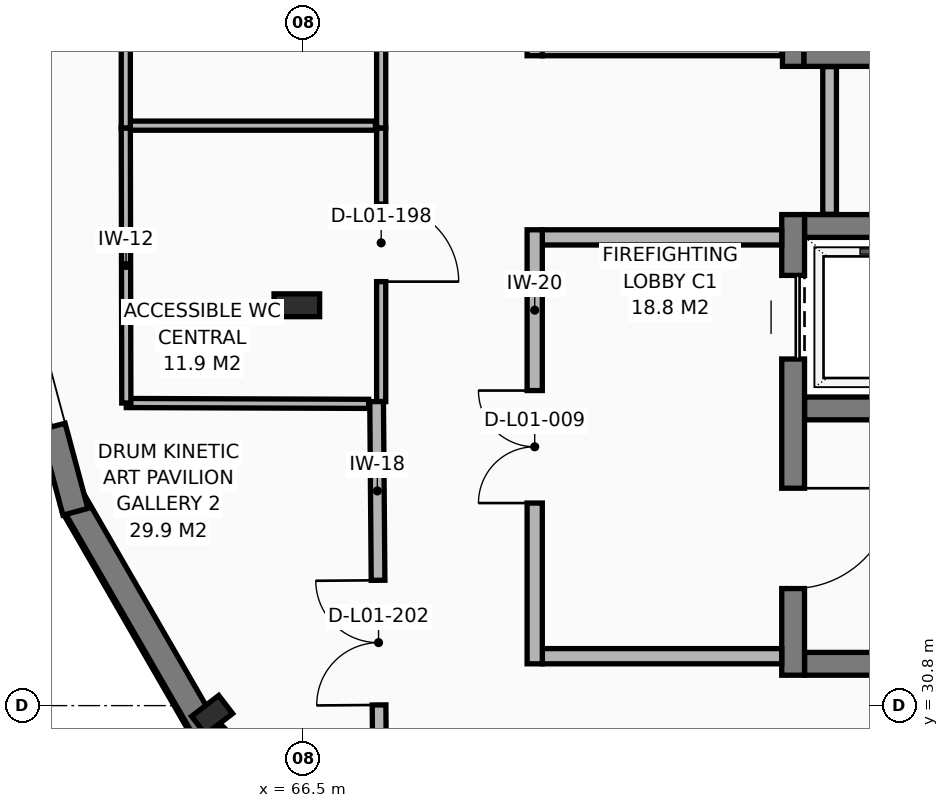
"""IFC4 building model, lengths in metres.
Left out: names, types, materials, properties, quantities, classifications, styles, units other than length and angle.
Written with IfcOpenShell. Run it as: python <this file> out.ifc"""

import sys

from ifc_helpers import new_model, si_unit, direction, frame, frame_2d, origin, origin_2d, place, context, subcontext, project, spatial, rectangle, i_section, extrude, element, fill, save


model = new_model("IFC4")
c1 = context("Model", 3, precision=1e-05, world=origin(), true_north=direction((0.0, 1.0)))
c2 = subcontext(c1, "Body", "Model", "MODEL_VIEW")
j1 = project(units=[si_unit("LENGTHUNIT", "METRE"), si_unit("PLANEANGLEUNIT", "RADIAN")], contexts=[c1])
p1 = place(None, origin())
s1 = spatial("IfcSite", under=j1, at=p1, CompositionType="ELEMENT")
p2 = place(p1, origin())
s2 = spatial("IfcBuilding", under=s1, at=p2, CompositionType="ELEMENT")
p3 = place(p2, frame((0.0, 0.0, 5.1)))
s3 = spatial("IfcBuildingStorey", under=s2, at=p3, CompositionType="ELEMENT", Elevation=5.1)
p4 = place(p3, frame((65.305, 30.677, 0.0), z_axis=(0.0, 0.0, 1.0), x_axis=(-0.793353340291, -0.608761429009, 0.0)))
e1 = element("IfcColumn", 1, at=p4, inside=s3, PredefinedType="COLUMN", context=c2, shape_type="SweptSolid", body=[
    extrude(i_section(OverallWidth=0.3, OverallDepth=0.45, WebThickness=0.014, FlangeThickness=0.026, FilletRadius=0.027, at=origin_2d()), origin(), (0.0, 0.0, 1.0), 4.42),
])
p5 = place(p3, frame((66.42, 36.067, 0.0), z_axis=(0.0, 0.0, 1.0), x_axis=(1.0, 0.0, 0.0)))
e2 = element("IfcColumn", 2, at=p5, inside=s3, PredefinedType="COLUMN", context=c2, shape_type="SweptSolid", body=[
    extrude(i_section(OverallWidth=0.3, OverallDepth=0.6, WebThickness=0.015, FlangeThickness=0.03, FilletRadius=0.027, at=origin_2d()), origin(), (0.0, 0.0, 1.0), 4.42),
])
p6 = place(p3, frame((67.689, 28.043, 0.0), z_axis=(0.0, 0.0, 1.0), x_axis=(-0.707106781187, 0.707106781187, 0.0)))
e3 = element("IfcWall", 3, at=p6, inside=s3, PredefinedType="SOLIDWALL", context=c2, shape_type="SweptSolid", body=[
    extrude(rectangle(XDim=3.571, YDim=0.34, at=frame_2d((1.786, 0.0))), origin(), (0.0, 0.0, 1.0), 4.2),
])
p7 = place(p6, frame((1.161, 0.0, 0.85)))
e4 = element("IfcOpeningElement", 4, at=p7, cuts=e3, PredefinedType="OPENING", context=c2, shape_type="SweptSolid", body=[
    extrude(rectangle(XDim=1.25, YDim=1.7, at=frame_2d((0.625, 0.85))), frame((0.0, 0.18, 0.0), z_axis=(0.0, -1.0, 0.0), x_axis=(1.0, 0.0, 0.0)), (0.0, 0.0, 1.0), 0.36),
])
p8 = place(p3, frame((65.249, 30.421, 0.0), z_axis=(0.0, 0.0, 1.0), x_axis=(-0.500006500783, 0.866021650523, 0.0)))
e5 = element("IfcWall", 5, at=p8, inside=s3, PredefinedType="SOLIDWALL", context=c2, shape_type="SweptSolid", body=[
    extrude(rectangle(XDim=3.571, YDim=0.34, at=frame_2d((1.786, 0.0))), origin(), (0.0, 0.0, 1.0), 4.2),
])
p9 = place(p3, frame((63.507, 33.35, 0.0), z_axis=(0.0, 0.0, 1.0), x_axis=(-0.258764562387, 0.965940423242, 0.0)))
e6 = element("IfcWall", 6, at=p9, inside=s3, PredefinedType="SOLIDWALL", context=c2, shape_type="SweptSolid", body=[
    extrude(rectangle(XDim=3.571, YDim=0.34, at=frame_2d((1.786, 0.0))), origin(), (0.0, 0.0, 1.0), 4.2),
])
p10 = place(p9, frame((1.161, 0.0, 0.85)))
e7 = element("IfcOpeningElement", 7, at=p10, cuts=e6, PredefinedType="OPENING", context=c2, shape_type="SweptSolid", body=[
    extrude(rectangle(XDim=1.25, YDim=1.7, at=frame_2d((0.625, 0.85))), frame((0.0, 0.18, 0.0), z_axis=(0.0, -1.0, 0.0), x_axis=(1.0, 0.0, 0.0)), (0.0, 0.0, 1.0), 0.36),
])
for number, where, z_axis, x_axis in (
    (8, (73.1, 31.35, 0.0), (0.0, 0.0, 1.0), (1.0, 0.0, 0.0)),
    (9, (80.8, 34.71, 0.0), (0.0, 0.0, 1.0), (-1.0, 0.0, 0.0)),
):
    element("IfcWall", number, at=place(p3, frame(where, z_axis=z_axis, x_axis=x_axis)), inside=s3, PredefinedType="SHEAR", context=c2, shape_type="SweptSolid", body=[
        extrude(rectangle(XDim=7.7, YDim=0.3, at=frame_2d((3.85, 0.0))), origin(), (0.0, 0.0, 1.0), 4.2),
    ])
p11 = place(p3, frame((76.3, 37.11, 0.0), z_axis=(0.0, 0.0, 1.0), x_axis=(-1.0, 0.0, 0.0)))
e10 = element("IfcWall", 10, at=p11, inside=s3, PredefinedType="SHEAR", context=c2, shape_type="SweptSolid", body=[
    extrude(rectangle(XDim=3.2, YDim=0.3, at=frame_2d((1.6, 0.0))), origin(), (0.0, 0.0, 1.0), 4.2),
])
p12 = place(p3, frame((72.95, 37.26, 0.0), z_axis=(0.0, 0.0, 1.0), x_axis=(0.0, -1.0, 0.0)))
e11 = element("IfcWall", 11, at=p12, inside=s3, PredefinedType="SHEAR", context=c2, shape_type="SweptSolid", body=[
    extrude(rectangle(XDim=6.06, YDim=0.3, at=frame_2d((3.03, 0.0))), origin(), (0.0, 0.0, 1.0), 4.2),
])
p13 = place(p12, frame((0.8, 0.0, 0.0)))
e12 = element("IfcOpeningElement", 12, at=p13, cuts=e11, PredefinedType="OPENING", context=c2, shape_type="SweptSolid", body=[
    extrude(rectangle(XDim=1.1, YDim=2.12, at=frame_2d((0.55, 1.06))), frame((0.0, 0.16, 0.0), z_axis=(0.0, -1.0, 0.0), x_axis=(1.0, 0.0, 0.0)), (0.0, 0.0, 1.0), 0.32),
])
p14 = place(p12, frame((3.6, 0.0, 0.0)))
e13 = element("IfcOpeningElement", 13, at=p14, cuts=e11, PredefinedType="OPENING", context=c2, shape_type="SweptSolid", body=[
    extrude(rectangle(XDim=1.32, YDim=2.12, at=frame_2d((0.66, 1.06))), frame((0.0, 0.16, 0.0), z_axis=(0.0, -1.0, 0.0), x_axis=(1.0, 0.0, 0.0)), (0.0, 0.0, 1.0), 0.32),
])
p15 = place(p3, frame((69.65, 31.45, 0.0), z_axis=(0.0, 0.0, 1.0), x_axis=(1.0, 0.0, 0.0)))
e14 = element("IfcWall", 14, at=p15, inside=s3, PredefinedType="PARTITIONING", context=c2, shape_type="SweptSolid", body=[
    extrude(rectangle(XDim=3.15, YDim=0.2, at=frame_2d((1.575, 0.0))), origin(), (0.0, 0.0, 1.0), 3.59),
])
p16 = place(p3, frame((72.8, 36.96, 0.0), z_axis=(0.0, 0.0, 1.0), x_axis=(-1.0, 0.0, 0.0)))
e15 = element("IfcWall", 15, at=p16, inside=s3, PredefinedType="PARTITIONING", context=c2, shape_type="SweptSolid", body=[
    extrude(rectangle(XDim=3.15, YDim=0.2, at=frame_2d((1.575, 0.0))), origin(), (0.0, 0.0, 1.0), 4.2),
])
p17 = place(p3, frame((69.55, 31.35, 0.0), z_axis=(0.0, 0.0, 1.0), x_axis=(0.0, 1.0, 0.0)))
e16 = element("IfcWall", 16, at=p17, inside=s3, PredefinedType="PARTITIONING", context=c2, shape_type="SweptSolid", body=[
    extrude(rectangle(XDim=5.71, YDim=0.2, at=frame_2d((2.855, 0.0))), origin(), (0.0, 0.0, 1.0), 3.59),
])
p18 = place(p17, frame((2.115, 0.0, 0.0)))
e17 = element("IfcOpeningElement", 17, at=p18, cuts=e16, PredefinedType="OPENING", context=c2, shape_type="SweptSolid", body=[
    extrude(rectangle(XDim=1.48, YDim=2.15, at=frame_2d((0.74, 1.075))), frame((0.0, 0.11, 0.0), z_axis=(0.0, -1.0, 0.0), x_axis=(1.0, 0.0, 0.0)), (0.0, 0.0, 1.0), 0.22),
])
p19 = place(p3, frame((73.09, 39.35, 0.0), z_axis=(0.0, 0.0, 1.0), x_axis=(1.0, 0.0, 0.0)))
e18 = element("IfcWall", 18, at=p19, inside=s3, PredefinedType="SHEAR", context=c2, shape_type="SweptSolid", body=[
    extrude(rectangle(XDim=7.7, YDim=0.28, at=frame_2d((3.85, 0.0))), origin(), (0.0, 0.0, 1.0), 4.2),
])
p20 = place(p3, frame((72.95, 45.25, 0.0), z_axis=(0.0, 0.0, 1.0), x_axis=(0.0, -1.0, 0.0)))
e19 = element("IfcWall", 19, at=p20, inside=s3, PredefinedType="SHEAR", context=c2, shape_type="SweptSolid", body=[
    extrude(rectangle(XDim=6.04, YDim=0.28, at=frame_2d((3.02, 0.0))), origin(), (0.0, 0.0, 1.0), 4.2),
])
p21 = place(p20, frame((0.8, 0.0, 0.0)))
e20 = element("IfcOpeningElement", 20, at=p21, cuts=e19, PredefinedType="OPENING", context=c2, shape_type="SweptSolid", body=[
    extrude(rectangle(XDim=1.1, YDim=2.12, at=frame_2d((0.55, 1.06))), frame((0.0, 0.15, 0.0), z_axis=(0.0, -1.0, 0.0), x_axis=(1.0, 0.0, 0.0)), (0.0, 0.0, 1.0), 0.3),
])
p22 = place(p20, frame((3.6, 0.0, 0.0)))
e21 = element("IfcOpeningElement", 21, at=p22, cuts=e19, PredefinedType="OPENING", context=c2, shape_type="SweptSolid", body=[
    extrude(rectangle(XDim=1.32, YDim=2.12, at=frame_2d((0.66, 1.06))), frame((0.0, 0.15, 0.0), z_axis=(0.0, -1.0, 0.0), x_axis=(1.0, 0.0, 0.0)), (0.0, 0.0, 1.0), 0.3),
])
p23 = place(p3, frame((69.65, 39.45, 0.0), z_axis=(0.0, 0.0, 1.0), x_axis=(1.0, 0.0, 0.0)))
e22 = element("IfcWall", 22, at=p23, inside=s3, PredefinedType="PARTITIONING", context=c2, shape_type="SweptSolid", body=[
    extrude(rectangle(XDim=3.15, YDim=0.2, at=frame_2d((1.575, 0.0))), origin(), (0.0, 0.0, 1.0), 4.2),
])
p24 = place(p3, frame((69.55, 39.35, 0.0), z_axis=(0.0, 0.0, 1.0), x_axis=(0.0, 1.0, 0.0)))
e23 = element("IfcWall", 23, at=p24, inside=s3, PredefinedType="PARTITIONING", context=c2, shape_type="SweptSolid", body=[
    extrude(rectangle(XDim=5.71, YDim=0.2, at=frame_2d((2.855, 0.0))), origin(), (0.0, 0.0, 1.0), 3.59),
])
p25 = place(p24, frame((2.115, 0.0, 0.0)))
e24 = element("IfcOpeningElement", 24, at=p25, cuts=e23, PredefinedType="OPENING", context=c2, shape_type="SweptSolid", body=[
    extrude(rectangle(XDim=1.48, YDim=2.15, at=frame_2d((0.74, 1.075))), frame((0.0, 0.11, 0.0), z_axis=(0.0, -1.0, 0.0), x_axis=(1.0, 0.0, 0.0)), (0.0, 0.0, 1.0), 0.22),
])
p26 = place(p3, frame((67.53, 38.4, 0.0), z_axis=(0.0, 0.0, 1.0), x_axis=(0.0, -1.0, 0.0)))
e25 = element("IfcWall", 25, at=p26, inside=s3, PredefinedType="PARTITIONING", context=c2, shape_type="SweptSolid", body=[
    extrude(rectangle(XDim=3.6, YDim=0.12, at=frame_2d((1.8, 0.0))), origin(), (0.0, 0.0, 1.0), 3.59),
])
p27 = place(p26, frame((1.002, 0.0, 0.0)))
e26 = element("IfcOpeningElement", 26, at=p27, cuts=e25, PredefinedType="OPENING", context=c2, shape_type="SweptSolid", body=[
    extrude(rectangle(XDim=1.02, YDim=2.12, at=frame_2d((0.51, 1.06))), frame((0.0, 0.07, 0.0), z_axis=(0.0, -1.0, 0.0), x_axis=(1.0, 0.0, 0.0)), (0.0, 0.0, 1.0), 0.14),
])
p28 = place(p3, frame((67.53, 42.0, 0.0), z_axis=(0.0, 0.0, 1.0), x_axis=(0.0, -1.0, 0.0)))
e27 = element("IfcWall", 27, at=p28, inside=s3, PredefinedType="PARTITIONING", context=c2, shape_type="SweptSolid", body=[
    extrude(rectangle(XDim=3.6, YDim=0.12, at=frame_2d((1.8, 0.0))), origin(), (0.0, 0.0, 1.0), 3.59),
])
p29 = place(p28, frame((1.32, 0.0, 0.0)))
e28 = element("IfcOpeningElement", 28, at=p29, cuts=e27, PredefinedType="OPENING", context=c2, shape_type="SweptSolid", body=[
    extrude(rectangle(XDim=0.96, YDim=2.1, at=frame_2d((0.48, 1.05))), frame((0.0, 0.07, 0.0), z_axis=(0.0, -1.0, 0.0), x_axis=(1.0, 0.0, 0.0)), (0.0, 0.0, 1.0), 0.14),
])
p30 = place(p3, frame((73.43, 39.206, 0.0), z_axis=(0.0, 0.0, 1.0), x_axis=(0.0, -1.0, 0.0)))
e29 = element("IfcWall", 29, at=p30, inside=s3, PredefinedType="PARTITIONING", context=c2, shape_type="SweptSolid", body=[
    extrude(rectangle(XDim=1.942, YDim=0.18, at=frame_2d((0.971, 0.0))), origin(), (0.0, 0.0, 1.0), 4.19),
])
p31 = place(p3, frame((67.521, 28.458, 0.0), z_axis=(0.0, 0.0, 1.0), x_axis=(-0.008044699063, 0.999967640885, 0.0)))
e30 = element("IfcWall", 30, at=p31, inside=s3, PredefinedType="PARTITIONING", context=c2, shape_type="SweptSolid", body=[
    extrude(rectangle(XDim=6.343, YDim=0.18, at=frame_2d((3.171, 0.0))), origin(), (0.0, 0.0, 1.0), 3.59),
])
p32 = place(p31, frame((2.351, 0.0, 0.0)))
e31 = element("IfcOpeningElement", 31, at=p32, cuts=e30, PredefinedType="OPENING", context=c2, shape_type="SweptSolid", body=[
    extrude(rectangle(XDim=1.64, YDim=2.2, at=frame_2d((0.82, 1.1))), frame((0.0, 0.1, 0.0), z_axis=(0.0, -1.0, 0.0), x_axis=(1.0, 0.0, 0.0)), (0.0, 0.0, 1.0), 0.2),
])
p33 = place(p3, frame((64.2, 38.43, 0.0), z_axis=(0.0, 0.0, 1.0), x_axis=(1.0, 0.0, 0.0)))
e32 = element("IfcWall", 32, at=p33, inside=s3, PredefinedType="PARTITIONING", context=c2, shape_type="SweptSolid", body=[
    extrude(rectangle(XDim=3.255, YDim=0.12, at=frame_2d((1.627, 0.0))), origin(), (0.0, 0.0, 1.0), 3.59),
])
p34 = place(p3, frame((67.365, 34.77, 0.0), z_axis=(0.0, 0.0, 1.0), x_axis=(-0.999994063851, 0.003445615075, 0.0)))
e33 = element("IfcWall", 33, at=p34, inside=s3, PredefinedType="PARTITIONING", context=c2, shape_type="SweptSolid", body=[
    extrude(rectangle(XDim=3.188, YDim=0.12, at=frame_2d((1.594, 0.0))), origin(), (0.0, 0.0, 1.0), 3.59),
])
p35 = place(p3, frame((64.177, 34.781, 0.0), z_axis=(0.0, 0.0, 1.0), x_axis=(-0.001888952982, 0.999998215927, 0.0)))
e34 = element("IfcWall", 34, at=p35, inside=s3, PredefinedType="PARTITIONING", context=c2, shape_type="SweptSolid", body=[
    extrude(rectangle(XDim=3.619, YDim=0.12, at=frame_2d((1.81, 0.0))), origin(), (0.0, 0.0, 1.0), 3.74),
])
p36 = place(p3, frame((64.17, 38.4, 0.0), z_axis=(0.0, 0.0, 1.0), x_axis=(0.0, 1.0, 0.0)))
e35 = element("IfcWall", 35, at=p36, inside=s3, PredefinedType="PARTITIONING", context=c2, shape_type="SweptSolid", body=[
    extrude(rectangle(XDim=3.6, YDim=0.12, at=frame_2d((1.8, 0.0))), origin(), (0.0, 0.0, 1.0), 4.19),
])
p37 = place(p10, origin())
e36 = element("IfcWindow", 36, at=p37, inside=s3, PartitioningType="SINGLE_PANEL", PredefinedType="WINDOW", context=c2, shape_type="SweptSolid", body=[
    extrude(rectangle(XDim=1.25, YDim=1.7, at=frame_2d((0.625, 0.85))), frame((0.0, 0.03, 0.0), z_axis=(0.0, -1.0, 0.0), x_axis=(1.0, 0.0, 0.0)), (0.0, 0.0, 1.0), 0.06),
])
fill(e7, e36)
p38 = place(p13, origin())
e37 = element("IfcDoor", 37, at=p38, inside=s3, OperationType="SLIDING_TO_LEFT", PredefinedType="DOOR", context=c2, shape_type="SweptSolid", body=[
    extrude(rectangle(XDim=1.1, YDim=2.12, at=frame_2d((0.55, 1.06))), frame((0.0, 0.025, 0.0), z_axis=(0.0, -1.0, 0.0), x_axis=(1.0, 0.0, 0.0)), (0.0, 0.0, 1.0), 0.05),
])
fill(e12, e37)
p39 = place(p14, origin())
e38 = element("IfcDoor", 38, at=p39, inside=s3, OperationType="SINGLE_SWING_LEFT", PredefinedType="DOOR", context=c2, shape_type="SweptSolid", body=[
    extrude(rectangle(XDim=1.32, YDim=2.12, at=frame_2d((0.66, 1.06))), frame((0.0, 0.025, 0.0), z_axis=(0.0, -1.0, 0.0), x_axis=(1.0, 0.0, 0.0)), (0.0, 0.0, 1.0), 0.05),
])
fill(e13, e38)
p40 = place(p18, origin())
e39 = element("IfcDoor", 39, at=p40, inside=s3, OperationType="DOUBLE_DOOR_SINGLE_SWING", PredefinedType="DOOR", context=c2, shape_type="SweptSolid", body=[
    extrude(rectangle(XDim=1.48, YDim=2.15, at=frame_2d((0.74, 1.075))), frame((0.0, 0.025, 0.0), z_axis=(0.0, -1.0, 0.0), x_axis=(1.0, 0.0, 0.0)), (0.0, 0.0, 1.0), 0.05),
])
fill(e17, e39)
p41 = place(p27, origin())
e40 = element("IfcDoor", 40, at=p41, inside=s3, OperationType="SINGLE_SWING_RIGHT", PredefinedType="DOOR", context=c2, shape_type="SweptSolid", body=[
    extrude(rectangle(XDim=1.02, YDim=2.12, at=frame_2d((0.51, 1.06))), frame((0.0, 0.025, 0.0), z_axis=(0.0, -1.0, 0.0), x_axis=(1.0, 0.0, 0.0)), (0.0, 0.0, 1.0), 0.05),
])
fill(e26, e40)
p42 = place(p32, origin())
e41 = element("IfcDoor", 41, at=p42, inside=s3, OperationType="DOUBLE_DOOR_SINGLE_SWING", PredefinedType="DOOR", context=c2, shape_type="SweptSolid", body=[
    extrude(rectangle(XDim=1.64, YDim=2.2, at=frame_2d((0.82, 1.1))), frame((0.0, 0.025, 0.0), z_axis=(0.0, -1.0, 0.0), x_axis=(1.0, 0.0, 0.0)), (0.0, 0.0, 1.0), 0.05),
])
fill(e31, e41)
save(model, sys.argv[1])
